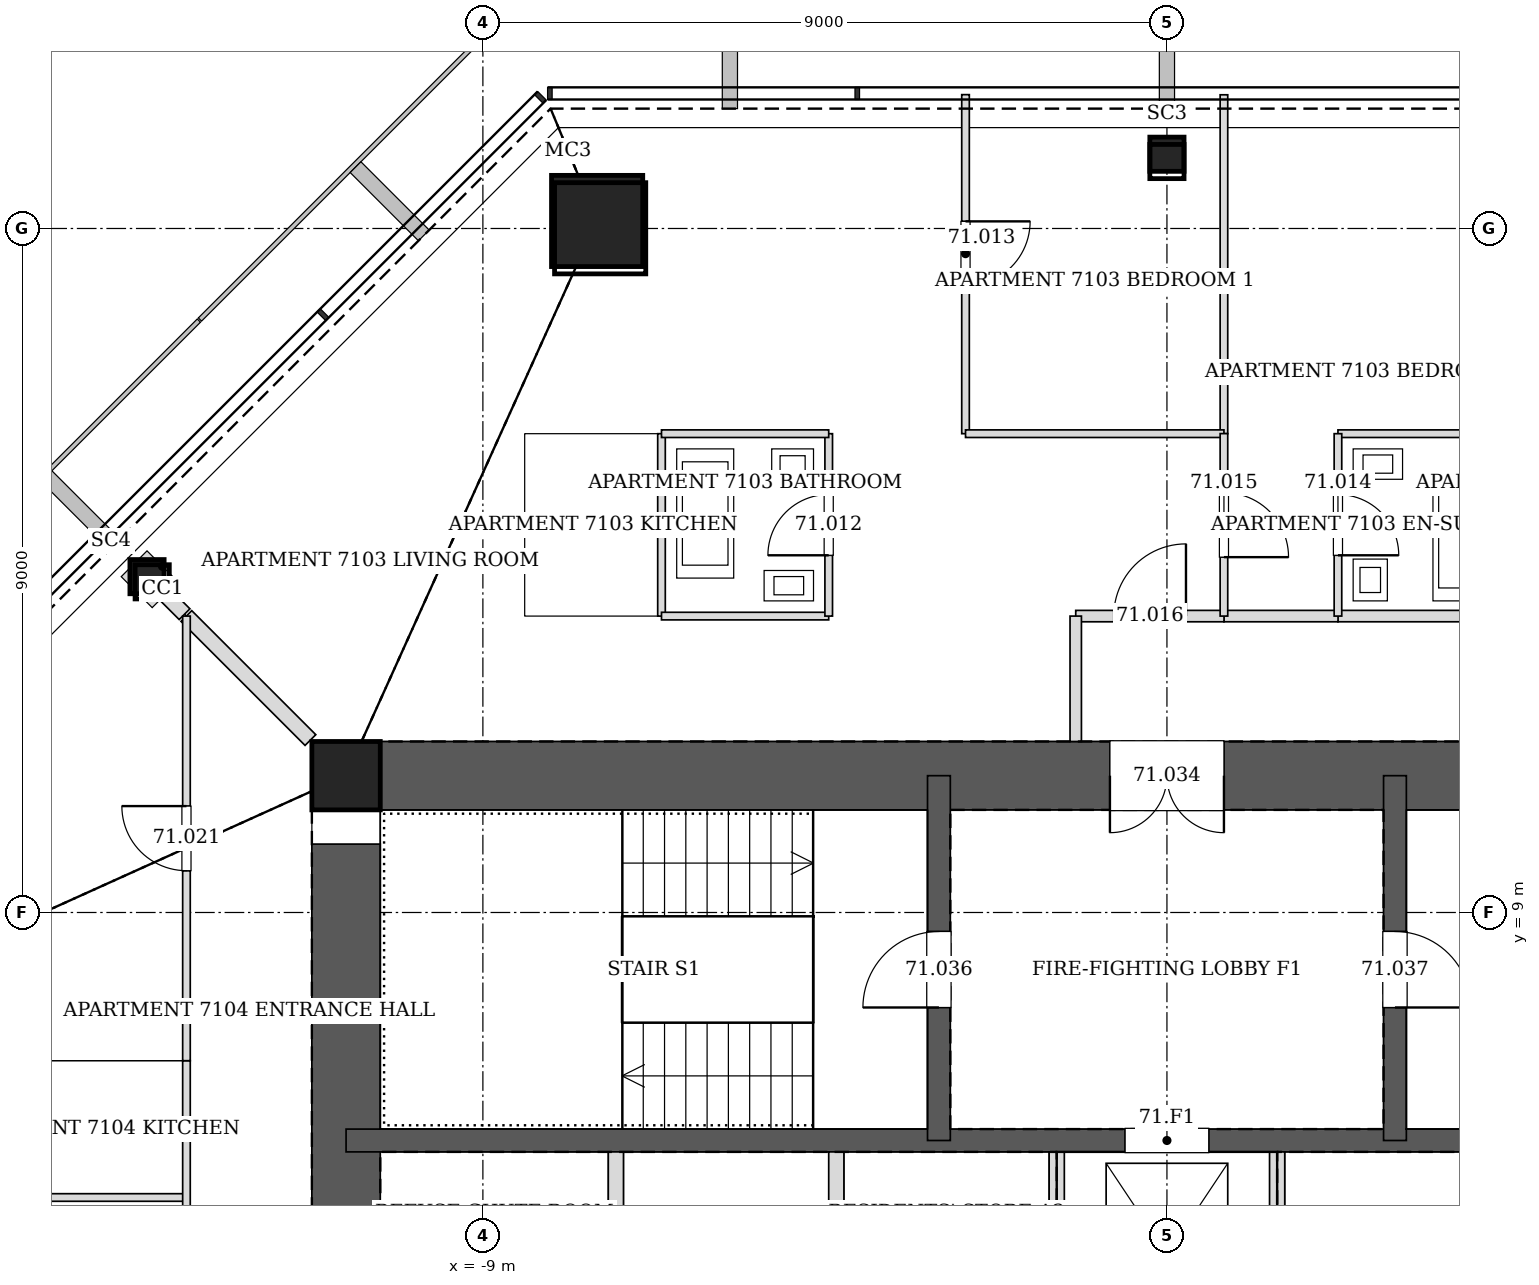
"""IFC4 building model, lengths in metres.
Left out: names, types, materials, properties, quantities, classifications, styles, units other than length and angle.
Written with IfcOpenShell. Run it as: python <this file> out.ifc"""

import sys

from ifc_helpers import new_model, si_unit, direction, frame, frame_2d, origin, origin_2d, place, context, subcontext, project, spatial, rectangle, hollow_rectangle, extrude, element, fill, save


model = new_model("IFC4")
c1 = context("Model", 3, precision=1e-05, world=origin(), true_north=direction((0.0, 1.0)))
c2 = subcontext(c1, "Body", "Model", "MODEL_VIEW")
j1 = project(units=[si_unit("LENGTHUNIT", "METRE"), si_unit("PLANEANGLEUNIT", "RADIAN")], contexts=[c1])
p1 = place(None, origin())
s1 = spatial("IfcSite", under=j1, at=p1, CompositionType="ELEMENT")
p2 = place(p1, origin())
s2 = spatial("IfcBuilding", under=s1, at=p2, CompositionType="ELEMENT")
p3 = place(p2, frame((0.0, 0.0, 291.2)))
s3 = spatial("IfcBuildingStorey", under=s2, at=p3, CompositionType="ELEMENT", Elevation=291.2)
p4 = place(p3, frame((-7.497, 18.099, 0.0), z_axis=(0.011698403216, -0.028277121884, 0.999531666202), x_axis=(0.924045401938, 0.382282742426, 0.0)))
e1 = element("IfcColumn", 1, at=p4, inside=s3, PredefinedType="COLUMN", context=c2, shape_type="SweptSolid", body=[
    extrude(hollow_rectangle(XDim=1.2, YDim=1.2, WallThickness=0.055, at=origin_2d()), origin(), (0.0, 0.0, 1.0), 3.402),
])
for number, where, z_axis, x_axis in (
    (2, (0.0, 18.977, 0.0), (0.0, -0.028, 1.0), (1.0, 0.0, 0.0)),
    (3, (-13.419, 13.419, 0.0), (0.02, -0.02, 1.0), (0.707, 0.707, 0.0)),
):
    element("IfcColumn", number, at=place(p3, frame(where, z_axis=z_axis, x_axis=x_axis)), inside=s3, PredefinedType="COLUMN", context=c2, shape_type="SweptSolid", body=[
        extrude(hollow_rectangle(XDim=0.45, YDim=0.45, WallThickness=0.02, at=origin_2d()), origin(), (0.0, 0.0, 1.0), 3.402),
    ])
p5 = place(p3, frame((-10.8, 10.8, 0.0), z_axis=(0.0, 0.0, 1.0), x_axis=(1.0, 0.0, 0.0)))
e4 = element("IfcColumn", 4, at=p5, inside=s3, PredefinedType="COLUMN", context=c2, shape_type="SweptSolid", body=[
    extrude(hollow_rectangle(XDim=0.9, YDim=0.9, WallThickness=0.04, at=origin_2d()), origin(), (0.0, 0.0, 1.0), 3.4),
])
p6 = place(p3, frame((10.8, 10.8, 0.0), z_axis=(0.0, 0.0, 1.0), x_axis=(-1.0, 0.0, 0.0)))
e5 = element("IfcWall", 5, at=p6, inside=s3, PredefinedType="SOLIDWALL", context=c2, shape_type="SweptSolid", body=[
    extrude(rectangle(XDim=21.6, YDim=0.9, at=frame_2d((10.8, 0.0))), origin(), (0.0, 0.0, 1.0), 3.4),
])
p7 = place(p6, frame((10.05, 0.0, 0.0)))
e6 = element("IfcOpeningElement", 6, at=p7, cuts=e5, PredefinedType="OPENING", context=c2, shape_type="SweptSolid", body=[
    extrude(rectangle(XDim=1.5, YDim=2.1, at=frame_2d((0.75, 1.05))), frame((0.0, 0.46, 0.0), z_axis=(0.0, -1.0, 0.0), x_axis=(1.0, 0.0, 0.0)), (0.0, 0.0, 1.0), 0.92),
])
p8 = place(p3, frame((-10.8, 10.8, 0.0), z_axis=(0.0, 0.0, 1.0), x_axis=(0.0, -1.0, 0.0)))
e7 = element("IfcWall", 7, at=p8, inside=s3, PredefinedType="SOLIDWALL", context=c2, shape_type="SweptSolid", body=[
    extrude(rectangle(XDim=21.6, YDim=0.9, at=frame_2d((10.8, 0.0))), origin(), (0.0, 0.0, 1.0), 3.4),
])
p9 = place(p8, frame((8.7, 0.0, 0.0)))
e8 = element("IfcOpeningElement", 8, at=p9, cuts=e7, PredefinedType="OPENING", context=c2, shape_type="SweptSolid", body=[
    extrude(rectangle(XDim=1.2, YDim=2.1, at=frame_2d((0.6, 1.05))), frame((0.0, 0.46, 0.0), z_axis=(0.0, -1.0, 0.0), x_axis=(1.0, 0.0, 0.0)), (0.0, 0.0, 1.0), 0.92),
])
p10 = place(p8, frame((11.7, 0.0, 0.0)))
e9 = element("IfcOpeningElement", 9, at=p10, cuts=e7, PredefinedType="OPENING", context=c2, shape_type="SweptSolid", body=[
    extrude(rectangle(XDim=1.2, YDim=2.1, at=frame_2d((0.6, 1.05))), frame((0.0, 0.46, 0.0), z_axis=(0.0, -1.0, 0.0), x_axis=(1.0, 0.0, 0.0)), (0.0, 0.0, 1.0), 0.92),
])
p11 = place(p3, frame((-10.8, 6.0, 0.0), z_axis=(0.0, 0.0, 1.0), x_axis=(1.0, 0.0, 0.0)))
e10 = element("IfcWall", 10, at=p11, inside=s3, PredefinedType="SOLIDWALL", context=c2, shape_type="SweptSolid", body=[
    extrude(rectangle(XDim=21.6, YDim=0.3, at=frame_2d((10.8, 0.0))), origin(), (0.0, 0.0, 1.0), 3.4),
])
p12 = place(p11, frame((10.25, 0.0, 0.0)))
e11 = element("IfcOpeningElement", 11, at=p12, cuts=e10, PredefinedType="OPENING", context=c2, shape_type="SweptSolid", body=[
    extrude(rectangle(XDim=1.1, YDim=2.1, at=frame_2d((0.55, 1.05))), frame((0.0, 0.16, 0.0), z_axis=(0.0, -1.0, 0.0), x_axis=(1.0, 0.0, 0.0)), (0.0, 0.0, 1.0), 0.32),
])
p13 = place(p3, frame((-3.0, 6.0, 0.0), z_axis=(0.0, 0.0, 1.0), x_axis=(0.0, 1.0, 0.0)))
e12 = element("IfcWall", 12, at=p13, inside=s3, PredefinedType="SOLIDWALL", context=c2, shape_type="SweptSolid", body=[
    extrude(rectangle(XDim=4.8, YDim=0.3, at=frame_2d((2.4, 0.0))), origin(), (0.0, 0.0, 1.0), 3.4),
])
p14 = place(p13, frame((1.75, 0.0, 0.0)))
e13 = element("IfcOpeningElement", 13, at=p14, cuts=e12, PredefinedType="OPENING", context=c2, shape_type="SweptSolid", body=[
    extrude(rectangle(XDim=1.0, YDim=2.1, at=frame_2d((0.5, 1.05))), frame((0.0, 0.16, 0.0), z_axis=(0.0, -1.0, 0.0), x_axis=(1.0, 0.0, 0.0)), (0.0, 0.0, 1.0), 0.32),
])
p15 = place(p3, frame((3.0, 6.0, 0.0), z_axis=(0.0, 0.0, 1.0), x_axis=(0.0, 1.0, 0.0)))
e14 = element("IfcWall", 14, at=p15, inside=s3, PredefinedType="SOLIDWALL", context=c2, shape_type="SweptSolid", body=[
    extrude(rectangle(XDim=4.8, YDim=0.3, at=frame_2d((2.4, 0.0))), origin(), (0.0, 0.0, 1.0), 3.4),
])
p16 = place(p15, frame((1.75, 0.0, 0.0)))
e15 = element("IfcOpeningElement", 15, at=p16, cuts=e14, PredefinedType="OPENING", context=c2, shape_type="SweptSolid", body=[
    extrude(rectangle(XDim=1.0, YDim=2.1, at=frame_2d((0.5, 1.05))), frame((0.0, 0.16, 0.0), z_axis=(0.0, -1.0, 0.0), x_axis=(1.0, 0.0, 0.0)), (0.0, 0.0, 1.0), 0.32),
])
p17 = place(p3, frame((4.451, 12.9, 0.0), z_axis=(0.0, 0.0, 1.0), x_axis=(-1.0, 0.0, 0.0)))
e16 = element("IfcWall", 16, at=p17, inside=s3, PredefinedType="PARTITIONING", context=c2, shape_type="SweptSolid", body=[
    extrude(rectangle(XDim=2.202, YDim=0.15, at=frame_2d((1.101, 0.0))), origin(), (0.0, 0.0, 1.0), 3.2),
])
p18 = place(p3, frame((2.251, 12.9, 0.0), z_axis=(0.0, 0.0, 1.0), x_axis=(-1.0, 0.0, 0.0)))
e17 = element("IfcWall", 17, at=p18, inside=s3, PredefinedType="PARTITIONING", context=c2, shape_type="SweptSolid", body=[
    extrude(rectangle(XDim=1.502, YDim=0.15, at=frame_2d((0.751, 0.0))), origin(), (0.0, 0.0, 1.0), 3.2),
])
p19 = place(p3, frame((0.751, 12.9, 0.0), z_axis=(0.0, 0.0, 1.0), x_axis=(-1.0, 0.0, 0.0)))
e18 = element("IfcWall", 18, at=p19, inside=s3, PredefinedType="PARTITIONING", context=c2, shape_type="SweptSolid", body=[
    extrude(rectangle(XDim=1.951, YDim=0.15, at=frame_2d((0.976, 0.0))), origin(), (0.0, 0.0, 1.0), 2.349),
])
p20 = place(p19, frame((0.5, 0.0, 0.0)))
e19 = element("IfcOpeningElement", 19, at=p20, cuts=e18, PredefinedType="OPENING", context=c2, shape_type="SweptSolid", body=[
    extrude(rectangle(XDim=0.95, YDim=2.1, at=frame_2d((0.475, 1.05))), frame((0.0, 0.085, 0.0), z_axis=(0.0, -1.0, 0.0), x_axis=(1.0, 0.0, 0.0)), (0.0, 0.0, 1.0), 0.17),
])
p21 = place(p3, frame((-1.2, 12.9, 0.0), z_axis=(0.0, 0.0, 1.0), x_axis=(0.0, -1.0, 0.0)))
e20 = element("IfcWall", 20, at=p21, inside=s3, PredefinedType="PARTITIONING", context=c2, shape_type="SweptSolid", body=[
    extrude(rectangle(XDim=1.65, YDim=0.15, at=frame_2d((0.825, 0.0))), origin(), (0.0, 0.0, 1.0), 3.2),
])
p22 = place(p3, frame((-6.65, 12.9, 0.0), z_axis=(0.0, 0.0, 1.0), x_axis=(0.0, 1.0, 0.0)))
e21 = element("IfcWall", 21, at=p22, inside=s3, PredefinedType="PARTITIONING", context=c2, shape_type="SweptSolid", body=[
    extrude(rectangle(XDim=2.4, YDim=0.1, at=frame_2d((1.2, 0.0))), origin(), (0.0, 0.0, 1.0), 2.73),
])
p23 = place(p3, frame((-6.65, 12.9, 0.0), z_axis=(0.0, 0.0, 1.0), x_axis=(1.0, 0.0, 0.0)))
e22 = element("IfcWall", 22, at=p23, inside=s3, PredefinedType="PARTITIONING", context=c2, shape_type="SweptSolid", body=[
    extrude(rectangle(XDim=2.2, YDim=0.1, at=frame_2d((1.1, 0.0))), origin(), (0.0, 0.0, 1.0), 3.2),
])
p24 = place(p3, frame((-4.45, 12.9, 0.0), z_axis=(0.0, 0.0, 1.0), x_axis=(0.0, 1.0, 0.0)))
e23 = element("IfcWall", 23, at=p24, inside=s3, PredefinedType="PARTITIONING", context=c2, shape_type="SweptSolid", body=[
    extrude(rectangle(XDim=2.4, YDim=0.1, at=frame_2d((1.2, 0.0))), origin(), (0.0, 0.0, 1.0), 2.73),
])
p25 = place(p24, frame((0.8, 0.0, 0.0)))
e24 = element("IfcOpeningElement", 24, at=p25, cuts=e23, PredefinedType="OPENING", context=c2, shape_type="SweptSolid", body=[
    extrude(rectangle(XDim=0.8, YDim=2.1, at=frame_2d((0.4, 1.05))), frame((0.0, 0.06, 0.0), z_axis=(0.0, -1.0, 0.0), x_axis=(1.0, 0.0, 0.0)), (0.0, 0.0, 1.0), 0.12),
])
p26 = place(p3, frame((-4.45, 15.3, 0.0), z_axis=(0.0, 0.0, 1.0), x_axis=(-1.0, 0.0, 0.0)))
e25 = element("IfcWall", 25, at=p26, inside=s3, PredefinedType="PARTITIONING", context=c2, shape_type="SweptSolid", body=[
    extrude(rectangle(XDim=2.2, YDim=0.1, at=frame_2d((1.1, 0.0))), origin(), (0.0, 0.0, 1.0), 3.2),
])
p27 = place(p3, frame((0.75, 15.3, 0.0), z_axis=(0.0, 0.0, 1.0), x_axis=(0.0, 1.0, 0.0)))
e26 = element("IfcWall", 26, at=p27, inside=s3, PredefinedType="PARTITIONING", context=c2, shape_type="SweptSolid", body=[
    extrude(rectangle(XDim=4.459, YDim=0.1, at=frame_2d((2.229, 0.0))), origin(), (0.0, 0.0, 1.0), 2.662),
])
p28 = place(p3, frame((-2.65, 19.761, 0.0), z_axis=(0.0, 0.0, 1.0), x_axis=(0.0, -1.0, 0.0)))
e27 = element("IfcWall", 27, at=p28, inside=s3, PredefinedType="PARTITIONING", context=c2, shape_type="SweptSolid", body=[
    extrude(rectangle(XDim=4.461, YDim=0.1, at=frame_2d((2.23, 0.0))), origin(), (0.0, 0.0, 1.0), 2.662),
])
p29 = place(p28, frame((1.667, 0.0, 0.0)))
e28 = element("IfcOpeningElement", 28, at=p29, cuts=e27, PredefinedType="OPENING", context=c2, shape_type="SweptSolid", body=[
    extrude(rectangle(XDim=0.85, YDim=2.1, at=frame_2d((0.425, 1.05))), frame((0.0, 0.06, 0.0), z_axis=(0.0, -1.0, 0.0), x_axis=(1.0, 0.0, 0.0)), (0.0, 0.0, 1.0), 0.12),
])
p30 = place(p3, frame((-2.65, 15.3, 0.0), z_axis=(0.0, 0.0, 1.0), x_axis=(1.0, 0.0, 0.0)))
e29 = element("IfcWall", 29, at=p30, inside=s3, PredefinedType="PARTITIONING", context=c2, shape_type="SweptSolid", body=[
    extrude(rectangle(XDim=3.4, YDim=0.1, at=frame_2d((1.7, 0.0))), origin(), (0.0, 0.0, 1.0), 2.349),
])
p31 = place(p3, frame((4.45, 15.3, 0.0), z_axis=(0.0, 0.0, 1.0), x_axis=(-1.0, 0.0, 0.0)))
e30 = element("IfcWall", 30, at=p31, inside=s3, PredefinedType="PARTITIONING", context=c2, shape_type="SweptSolid", body=[
    extrude(rectangle(XDim=2.2, YDim=0.1, at=frame_2d((1.1, 0.0))), origin(), (0.0, 0.0, 1.0), 3.2),
])
p32 = place(p3, frame((2.25, 15.3, 0.0), z_axis=(0.0, 0.0, 1.0), x_axis=(0.0, -1.0, 0.0)))
e31 = element("IfcWall", 31, at=p32, inside=s3, PredefinedType="PARTITIONING", context=c2, shape_type="SweptSolid", body=[
    extrude(rectangle(XDim=2.4, YDim=0.1, at=frame_2d((1.2, 0.0))), origin(), (0.0, 0.0, 1.0), 2.73),
])
p33 = place(p32, frame((0.8, 0.0, 0.0)))
e32 = element("IfcOpeningElement", 32, at=p33, cuts=e31, PredefinedType="OPENING", context=c2, shape_type="SweptSolid", body=[
    extrude(rectangle(XDim=0.8, YDim=2.1, at=frame_2d((0.4, 1.05))), frame((0.0, 0.06, 0.0), z_axis=(0.0, -1.0, 0.0), x_axis=(1.0, 0.0, 0.0)), (0.0, 0.0, 1.0), 0.12),
])
p34 = place(p3, frame((0.75, 15.301, 0.0), z_axis=(0.0, 0.0, 1.0), x_axis=(0.0, -1.0, 0.0)))
e33 = element("IfcWall", 33, at=p34, inside=s3, PredefinedType="PARTITIONING", context=c2, shape_type="SweptSolid", body=[
    extrude(rectangle(XDim=2.401, YDim=0.1, at=frame_2d((1.201, 0.0))), origin(), (0.0, 0.0, 1.0), 2.73),
])
p35 = place(p34, frame((0.775, 0.0, 0.0)))
e34 = element("IfcOpeningElement", 34, at=p35, cuts=e33, PredefinedType="OPENING", context=c2, shape_type="SweptSolid", body=[
    extrude(rectangle(XDim=0.85, YDim=2.1, at=frame_2d((0.425, 1.05))), frame((0.0, 0.06, 0.0), z_axis=(0.0, -1.0, 0.0), x_axis=(1.0, 0.0, 0.0)), (0.0, 0.0, 1.0), 0.12),
])
p36 = place(p3, frame((-13.178, 13.178, 0.0), z_axis=(0.0, 0.0, 1.0), x_axis=(0.707106781187, -0.707106781187, 0.0)))
e35 = element("IfcWall", 35, at=p36, inside=s3, PredefinedType="PARTITIONING", context=c2, shape_type="SweptSolid", body=[
    extrude(rectangle(XDim=0.358, YDim=0.2, at=frame_2d((0.179, 0.0))), origin(), (0.0, 0.0, 1.0), 2.591),
])
p37 = place(p3, frame((-12.901, 12.901, 0.0), z_axis=(0.0, 0.0, 1.0), x_axis=(0.707106781187, -0.707106781187, 0.0)))
e36 = element("IfcWall", 36, at=p37, inside=s3, PredefinedType="PARTITIONING", context=c2, shape_type="SweptSolid", body=[
    extrude(rectangle(XDim=2.308, YDim=0.2, at=frame_2d((1.154, 0.0))), origin(), (0.0, 0.0, 1.0), 2.591),
])
p38 = place(p3, frame((-15.3, 5.25, 0.0), z_axis=(0.0, 0.0, 1.0), x_axis=(1.0, 0.0, 0.0)))
e37 = element("IfcWall", 37, at=p38, inside=s3, PredefinedType="PARTITIONING", context=c2, shape_type="SweptSolid", body=[
    extrude(rectangle(XDim=2.4, YDim=0.1, at=frame_2d((1.2, 0.0))), origin(), (0.0, 0.0, 1.0), 2.73),
])
p39 = place(p3, frame((-12.9, 7.05, 0.0), z_axis=(0.0, 0.0, 1.0), x_axis=(0.0, -1.0, 0.0)))
e38 = element("IfcWall", 38, at=p39, inside=s3, PredefinedType="PARTITIONING", context=c2, shape_type="SweptSolid", body=[
    extrude(rectangle(XDim=4.551, YDim=0.1, at=frame_2d((2.275, 0.0))), origin(), (0.0, 0.0, 1.0), 3.2),
])
p40 = place(p3, frame((-12.9, 7.05, 0.0), z_axis=(0.0, 0.0, 1.0), x_axis=(0.0, 1.0, 0.0)))
e39 = element("IfcWall", 39, at=p40, inside=s3, PredefinedType="PARTITIONING", context=c2, shape_type="SweptSolid", body=[
    extrude(rectangle(XDim=5.85, YDim=0.1, at=frame_2d((2.925, 0.0))), origin(), (0.0, 0.0, 1.0), 2.497),
])
p41 = place(p40, frame((2.5, 0.0, 0.0)))
e40 = element("IfcOpeningElement", 40, at=p41, cuts=e39, PredefinedType="OPENING", context=c2, shape_type="SweptSolid", body=[
    extrude(rectangle(XDim=0.85, YDim=2.1, at=frame_2d((0.425, 1.05))), frame((0.0, 0.06, 0.0), z_axis=(0.0, -1.0, 0.0), x_axis=(1.0, 0.0, 0.0)), (0.0, 0.0, 1.0), 0.12),
])
for number, where, z_axis, x_axis in (
    (41, (-7.25, 3.15, 0.0), (0.0, 0.0, 1.0), (0.0, 1.0, 0.0)),
    (42, (-4.35, 3.15, 0.0), (0.0, 0.0, 1.0), (0.0, 1.0, 0.0)),
    (43, (-1.45, 3.15, 0.0), (0.0, 0.0, 1.0), (0.0, 1.0, 0.0)),
    (44, (1.45, 3.15, 0.0), (0.0, 0.0, 1.0), (0.0, 1.0, 0.0)),
):
    element("IfcWall", number, at=place(p3, frame(where, z_axis=z_axis, x_axis=x_axis)), inside=s3, PredefinedType="PARTITIONING", context=c2, shape_type="SweptSolid", body=[
        extrude(rectangle(XDim=2.7, YDim=0.2, at=frame_2d((1.35, 0.0))), origin(), (0.0, 0.0, 1.0), 3.2),
    ])
p42 = place(p25, origin())
e45 = element("IfcDoor", 45, at=p42, inside=s3, OperationType="SINGLE_SWING_LEFT", PredefinedType="DOOR", context=c2, shape_type="SweptSolid", body=[
    extrude(rectangle(XDim=0.8, YDim=2.1, at=frame_2d((0.4, 1.05))), frame((0.0, 0.025, 0.0), z_axis=(0.0, -1.0, 0.0), x_axis=(1.0, 0.0, 0.0)), (0.0, 0.0, 1.0), 0.05),
])
fill(e24, e45)
p43 = place(p29, origin())
e46 = element("IfcDoor", 46, at=p43, inside=s3, OperationType="SINGLE_SWING_LEFT", PredefinedType="DOOR", context=c2, shape_type="SweptSolid", body=[
    extrude(rectangle(XDim=0.85, YDim=2.1, at=frame_2d((0.425, 1.05))), frame((0.0, 0.025, 0.0), z_axis=(0.0, -1.0, 0.0), x_axis=(1.0, 0.0, 0.0)), (0.0, 0.0, 1.0), 0.05),
])
fill(e28, e46)
p44 = place(p33, origin())
e47 = element("IfcDoor", 47, at=p44, inside=s3, OperationType="SINGLE_SWING_RIGHT", PredefinedType="DOOR", context=c2, shape_type="SweptSolid", body=[
    extrude(rectangle(XDim=0.8, YDim=2.1, at=frame_2d((0.4, 1.05))), frame((0.0, 0.025, 0.0), z_axis=(0.0, -1.0, 0.0), x_axis=(1.0, 0.0, 0.0)), (0.0, 0.0, 1.0), 0.05),
])
fill(e32, e47)
p45 = place(p35, origin())
e48 = element("IfcDoor", 48, at=p45, inside=s3, OperationType="SINGLE_SWING_RIGHT", PredefinedType="DOOR", context=c2, shape_type="SweptSolid", body=[
    extrude(rectangle(XDim=0.85, YDim=2.1, at=frame_2d((0.425, 1.05))), frame((0.0, 0.025, 0.0), z_axis=(0.0, -1.0, 0.0), x_axis=(1.0, 0.0, 0.0)), (0.0, 0.0, 1.0), 0.05),
])
fill(e34, e48)
p46 = place(p20, frame((0.95, 0.0, 0.0), z_axis=(0.0, 0.0, 1.0), x_axis=(-1.0, 0.0, 0.0)))
e49 = element("IfcDoor", 49, at=p46, inside=s3, OperationType="SINGLE_SWING_RIGHT", PredefinedType="DOOR", context=c2, shape_type="SweptSolid", body=[
    extrude(rectangle(XDim=0.95, YDim=2.1, at=frame_2d((0.475, 1.05))), frame((0.0, 0.025, 0.0), z_axis=(0.0, -1.0, 0.0), x_axis=(1.0, 0.0, 0.0)), (0.0, 0.0, 1.0), 0.05),
])
fill(e19, e49)
p47 = place(p41, origin())
e50 = element("IfcDoor", 50, at=p47, inside=s3, OperationType="SINGLE_SWING_RIGHT", PredefinedType="DOOR", context=c2, shape_type="SweptSolid", body=[
    extrude(rectangle(XDim=0.85, YDim=2.1, at=frame_2d((0.425, 1.05))), frame((0.0, 0.025, 0.0), z_axis=(0.0, -1.0, 0.0), x_axis=(1.0, 0.0, 0.0)), (0.0, 0.0, 1.0), 0.05),
])
fill(e40, e50)
p48 = place(p7, origin())
e51 = element("IfcDoor", 51, at=p48, inside=s3, OperationType="DOUBLE_DOOR_SINGLE_SWING", PredefinedType="DOOR", context=c2, shape_type="SweptSolid", body=[
    extrude(rectangle(XDim=1.5, YDim=2.1, at=frame_2d((0.75, 1.05))), frame((0.0, 0.025, 0.0), z_axis=(0.0, -1.0, 0.0), x_axis=(1.0, 0.0, 0.0)), (0.0, 0.0, 1.0), 0.05),
])
fill(e6, e51)
p49 = place(p14, origin())
e52 = element("IfcDoor", 52, at=p49, inside=s3, OperationType="SINGLE_SWING_LEFT", PredefinedType="DOOR", context=c2, shape_type="SweptSolid", body=[
    extrude(rectangle(XDim=1.0, YDim=2.1, at=frame_2d((0.5, 1.05))), frame((0.0, 0.025, 0.0), z_axis=(0.0, -1.0, 0.0), x_axis=(1.0, 0.0, 0.0)), (0.0, 0.0, 1.0), 0.05),
])
fill(e13, e52)
p50 = place(p16, frame((1.0, 0.0, 0.0), z_axis=(0.0, 0.0, 1.0), x_axis=(-1.0, 0.0, 0.0)))
e53 = element("IfcDoor", 53, at=p50, inside=s3, OperationType="SINGLE_SWING_RIGHT", PredefinedType="DOOR", context=c2, shape_type="SweptSolid", body=[
    extrude(rectangle(XDim=1.0, YDim=2.1, at=frame_2d((0.5, 1.05))), frame((0.0, 0.025, 0.0), z_axis=(0.0, -1.0, 0.0), x_axis=(1.0, 0.0, 0.0)), (0.0, 0.0, 1.0), 0.05),
])
fill(e15, e53)
p51 = place(p12, origin())
e54 = element("IfcDoor", 54, at=p51, inside=s3, OperationType="DOUBLE_DOOR_SLIDING", PredefinedType="DOOR", context=c2, shape_type="SweptSolid", body=[
    extrude(rectangle(XDim=1.1, YDim=2.1, at=frame_2d((0.55, 1.05))), frame((0.0, 0.025, 0.0), z_axis=(0.0, -1.0, 0.0), x_axis=(1.0, 0.0, 0.0)), (0.0, 0.0, 1.0), 0.05),
])
fill(e11, e54)
save(model, sys.argv[1])
